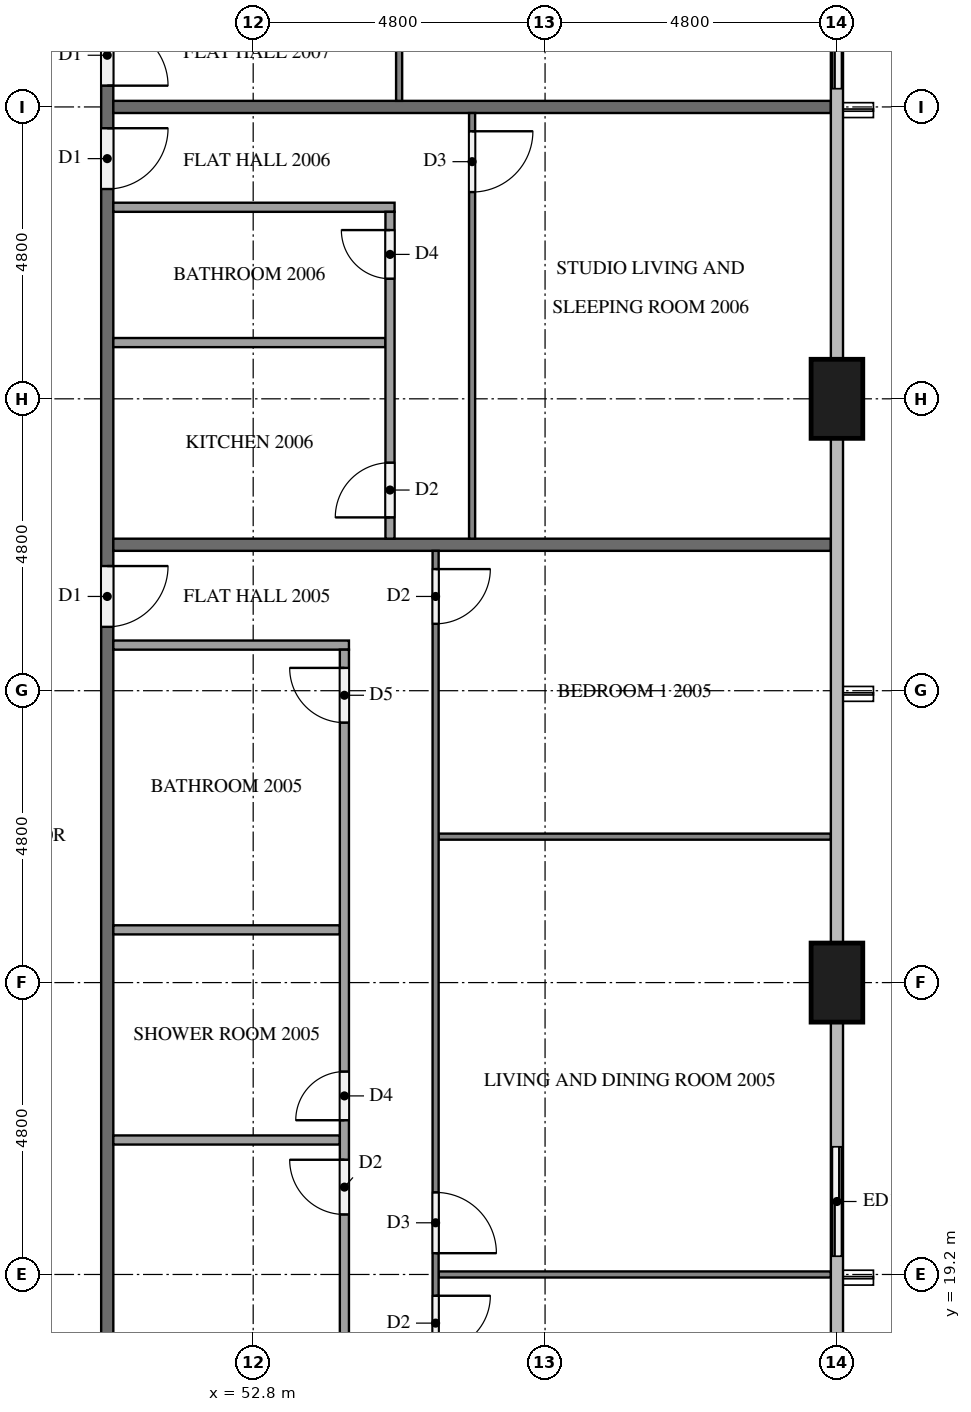
"""IFC4 building model, lengths in metres.
Left out: names, types, materials, properties, quantities, classifications, styles, units other than length and angle.
Written with IfcOpenShell. Run it as: python <this file> out.ifc"""

import sys

from ifc_helpers import new_model, si_unit, direction, frame, frame_2d, origin, origin_2d, place, context, subcontext, project, spatial, rectangle, extrude, element, fill, save


model = new_model("IFC4")
c1 = context("Model", 3, precision=1e-05, world=origin(), true_north=direction((0.0, 1.0)))
c2 = subcontext(c1, "Body", "Model", "MODEL_VIEW")
j1 = project(units=[si_unit("LENGTHUNIT", "METRE"), si_unit("PLANEANGLEUNIT", "RADIAN")], contexts=[c1])
p1 = place(None, origin())
s1 = spatial("IfcSite", under=j1, at=p1, CompositionType="ELEMENT")
p2 = place(p1, origin())
s2 = spatial("IfcBuilding", under=s1, at=p2, CompositionType="ELEMENT")
p3 = place(p2, frame((0.0, 0.0, 80.3)))
s3 = spatial("IfcBuildingStorey", under=s2, at=p3, CompositionType="ELEMENT", Elevation=80.3)
for number, where, z_axis, x_axis in (
    (1, (62.4, 24.0, 0.0), (0.0, 0.0, 1.0), (0.0, 1.0, 0.0)),
    (2, (62.4, 33.6, 0.0), (0.0, 0.0, 1.0), (0.0, 1.0, 0.0)),
):
    element("IfcColumn", number, at=place(p3, frame(where, z_axis=z_axis, x_axis=x_axis)), inside=s3, PredefinedType="COLUMN", context=c2, shape_type="SweptSolid", body=[
        extrude(rectangle(XDim=1.3, YDim=0.85, at=origin_2d()), origin(), (0.0, 0.0, 1.0), 3.1),
    ])
p4 = place(p3, frame((62.4, 19.2, 0.0), z_axis=(0.0, 0.0, 1.0), x_axis=(0.0, 1.0, 0.0)))
e3 = element("IfcWall", 3, at=p4, inside=s3, PredefinedType="SOLIDWALL", context=c2, shape_type="SweptSolid", body=[
    extrude(rectangle(XDim=2.4, YDim=0.15, at=frame_2d((1.2, 0.0))), origin(), (0.0, 0.0, 1.0), 3.1),
])
p5 = place(p4, frame((0.3, 0.0, 0.0)))
e4 = element("IfcOpeningElement", 4, at=p5, cuts=e3, PredefinedType="OPENING", context=c2, shape_type="SweptSolid", body=[
    extrude(rectangle(XDim=1.8, YDim=2.4, at=frame_2d((0.9, 1.2))), frame((0.0, 0.085, 0.0), z_axis=(0.0, -1.0, 0.0), x_axis=(1.0, 0.0, 0.0)), (0.0, 0.0, 1.0), 0.17),
])
p6 = place(p3, frame((62.4, 38.4, 0.0), z_axis=(0.0, 0.0, 1.0), x_axis=(0.0, 1.0, 0.0)))
e5 = element("IfcWall", 5, at=p6, inside=s3, PredefinedType="SOLIDWALL", context=c2, shape_type="SweptSolid", body=[
    extrude(rectangle(XDim=2.4, YDim=0.15, at=frame_2d((1.2, 0.0))), origin(), (0.0, 0.0, 1.0), 3.1),
])
p7 = place(p6, frame((0.3, 0.0, 0.0)))
e6 = element("IfcOpeningElement", 6, at=p7, cuts=e5, PredefinedType="OPENING", context=c2, shape_type="SweptSolid", body=[
    extrude(rectangle(XDim=1.8, YDim=2.4, at=frame_2d((0.9, 1.2))), frame((0.0, 0.085, 0.0), z_axis=(0.0, -1.0, 0.0), x_axis=(1.0, 0.0, 0.0)), (0.0, 0.0, 1.0), 0.17),
])
p8 = place(p3, frame((50.4, 40.7, 0.0), z_axis=(0.0, 0.0, 1.0), x_axis=(0.0, -1.0, 0.0)))
e7 = element("IfcWall", 7, at=p8, inside=s3, PredefinedType="PARTITIONING", context=c2, shape_type="SweptSolid", body=[
    extrude(rectangle(XDim=28.6, YDim=0.2, at=frame_2d((14.3, 0.0))), origin(), (0.0, 0.0, 1.0), 3.1),
])
p9 = place(p8, frame((26.65, 0.0, 0.0)))
e8 = element("IfcOpeningElement", 8, at=p9, cuts=e7, PredefinedType="OPENING", context=c2, shape_type="SweptSolid", body=[
    extrude(rectangle(XDim=1.0, YDim=2.1, at=frame_2d((0.5, 1.05))), frame((0.0, 0.11, 0.0), z_axis=(0.0, -1.0, 0.0), x_axis=(1.0, 0.0, 0.0)), (0.0, 0.0, 1.0), 0.22),
])
p10 = place(p8, frame((9.85, 0.0, 0.0)))
e9 = element("IfcOpeningElement", 9, at=p10, cuts=e7, PredefinedType="OPENING", context=c2, shape_type="SweptSolid", body=[
    extrude(rectangle(XDim=1.0, YDim=2.1, at=frame_2d((0.5, 1.05))), frame((0.0, 0.11, 0.0), z_axis=(0.0, -1.0, 0.0), x_axis=(1.0, 0.0, 0.0)), (0.0, 0.0, 1.0), 0.22),
])
p11 = place(p8, frame((2.65, 0.0, 0.0)))
e10 = element("IfcOpeningElement", 10, at=p11, cuts=e7, PredefinedType="OPENING", context=c2, shape_type="SweptSolid", body=[
    extrude(rectangle(XDim=1.0, YDim=2.1, at=frame_2d((0.5, 1.05))), frame((0.0, 0.11, 0.0), z_axis=(0.0, -1.0, 0.0), x_axis=(1.0, 0.0, 0.0)), (0.0, 0.0, 1.0), 0.22),
])
p12 = place(p8, frame((0.95, 0.0, 0.0)))
e11 = element("IfcOpeningElement", 11, at=p12, cuts=e7, PredefinedType="OPENING", context=c2, shape_type="SweptSolid", body=[
    extrude(rectangle(XDim=1.0, YDim=2.1, at=frame_2d((0.5, 1.05))), frame((0.0, 0.11, 0.0), z_axis=(0.0, -1.0, 0.0), x_axis=(1.0, 0.0, 0.0)), (0.0, 0.0, 1.0), 0.22),
])
for number, where, z_axis, x_axis in (
    (12, (50.5, 31.2, 0.0), (0.0, 0.0, 1.0), (1.0, 0.0, 0.0)),
    (13, (50.5, 38.4, 0.0), (0.0, 0.0, 1.0), (1.0, 0.0, 0.0)),
):
    element("IfcWall", number, at=place(p3, frame(where, z_axis=z_axis, x_axis=x_axis)), inside=s3, PredefinedType="PARTITIONING", context=c2, shape_type="SweptSolid", body=[
        extrude(rectangle(XDim=11.8, YDim=0.2, at=frame_2d((5.9, 0.0))), origin(), (0.0, 0.0, 1.0), 3.1),
    ])
for number, where, z_axis, x_axis in (
    (14, (55.85, 26.4, 0.0), (0.0, 0.0, 1.0), (1.0, 0.0, 0.0)),
    (15, (55.85, 19.2, 0.0), (0.0, 0.0, 1.0), (1.0, 0.0, 0.0)),
):
    element("IfcWall", number, at=place(p3, frame(where, z_axis=z_axis, x_axis=x_axis)), inside=s3, PredefinedType="PARTITIONING", context=c2, shape_type="SweptSolid", body=[
        extrude(rectangle(XDim=6.45, YDim=0.1, at=frame_2d((3.225, 0.0))), origin(), (0.0, 0.0, 1.0), 3.1),
    ])
p13 = place(p3, frame((55.8, 31.1, 0.0), z_axis=(0.0, 0.0, 1.0), x_axis=(0.0, -1.0, 0.0)))
e16 = element("IfcWall", 16, at=p13, inside=s3, PredefinedType="PARTITIONING", context=c2, shape_type="SweptSolid", body=[
    extrude(rectangle(XDim=16.6, YDim=0.1, at=frame_2d((8.3, 0.0))), origin(), (0.0, 0.0, 1.0), 3.1),
])
p14 = place(p13, frame((0.3, 0.0, 0.0)))
e17 = element("IfcOpeningElement", 17, at=p14, cuts=e16, PredefinedType="OPENING", context=c2, shape_type="SweptSolid", body=[
    extrude(rectangle(XDim=0.9, YDim=2.1, at=frame_2d((0.45, 1.05))), frame((0.0, 0.06, 0.0), z_axis=(0.0, -1.0, 0.0), x_axis=(1.0, 0.0, 0.0)), (0.0, 0.0, 1.0), 0.12),
])
p15 = place(p13, frame((10.55, 0.0, 0.0)))
e18 = element("IfcOpeningElement", 18, at=p15, cuts=e16, PredefinedType="OPENING", context=c2, shape_type="SweptSolid", body=[
    extrude(rectangle(XDim=1.0, YDim=2.1, at=frame_2d((0.5, 1.05))), frame((0.0, 0.06, 0.0), z_axis=(0.0, -1.0, 0.0), x_axis=(1.0, 0.0, 0.0)), (0.0, 0.0, 1.0), 0.12),
])
p16 = place(p13, frame((12.25, 0.0, 0.0)))
e19 = element("IfcOpeningElement", 19, at=p16, cuts=e16, PredefinedType="OPENING", context=c2, shape_type="SweptSolid", body=[
    extrude(rectangle(XDim=0.9, YDim=2.1, at=frame_2d((0.45, 1.05))), frame((0.0, 0.06, 0.0), z_axis=(0.0, -1.0, 0.0), x_axis=(1.0, 0.0, 0.0)), (0.0, 0.0, 1.0), 0.12),
])
for number, where, z_axis, x_axis in (
    (20, (50.5, 24.867, 0.0), (0.0, 0.0, 1.0), (1.0, 0.0, 0.0)),
    (21, (50.5, 21.412, 0.0), (0.0, 0.0, 1.0), (1.0, 0.0, 0.0)),
):
    element("IfcWall", number, at=place(p3, frame(where, z_axis=z_axis, x_axis=x_axis)), inside=s3, PredefinedType="PARTITIONING", context=c2, shape_type="SweptSolid", body=[
        extrude(rectangle(XDim=3.725, YDim=0.15, at=frame_2d((1.863, 0.0))), origin(), (0.0, 0.0, 1.0), 3.1),
    ])
p17 = place(p3, frame((50.5, 29.55, 0.0), z_axis=(0.0, 0.0, 1.0), x_axis=(1.0, 0.0, 0.0)))
e22 = element("IfcWall", 22, at=p17, inside=s3, PredefinedType="PARTITIONING", context=c2, shape_type="SweptSolid", body=[
    extrude(rectangle(XDim=3.875, YDim=0.15, at=frame_2d((1.938, 0.0))), origin(), (0.0, 0.0, 1.0), 3.1),
])
p18 = place(p3, frame((54.3, 14.5, 0.0), z_axis=(0.0, 0.0, 1.0), x_axis=(0.0, 1.0, 0.0)))
e23 = element("IfcWall", 23, at=p18, inside=s3, PredefinedType="PARTITIONING", context=c2, shape_type="SweptSolid", body=[
    extrude(rectangle(XDim=14.975, YDim=0.15, at=frame_2d((7.488, 0.0))), origin(), (0.0, 0.0, 1.0), 3.1),
])
p19 = place(p18, frame((13.775, 0.0, 0.0)))
e24 = element("IfcOpeningElement", 24, at=p19, cuts=e23, PredefinedType="OPENING", context=c2, shape_type="SweptSolid", body=[
    extrude(rectangle(XDim=0.9, YDim=2.1, at=frame_2d((0.45, 1.05))), frame((0.0, 0.085, 0.0), z_axis=(0.0, -1.0, 0.0), x_axis=(1.0, 0.0, 0.0)), (0.0, 0.0, 1.0), 0.17),
])
p20 = place(p18, frame((7.237, 0.0, 0.0)))
e25 = element("IfcOpeningElement", 25, at=p20, cuts=e23, PredefinedType="OPENING", context=c2, shape_type="SweptSolid", body=[
    extrude(rectangle(XDim=0.8, YDim=2.1, at=frame_2d((0.4, 1.05))), frame((0.0, 0.085, 0.0), z_axis=(0.0, -1.0, 0.0), x_axis=(1.0, 0.0, 0.0)), (0.0, 0.0, 1.0), 0.17),
])
p21 = place(p18, frame((5.687, 0.0, 0.0)))
e26 = element("IfcOpeningElement", 26, at=p21, cuts=e23, PredefinedType="OPENING", context=c2, shape_type="SweptSolid", body=[
    extrude(rectangle(XDim=0.9, YDim=2.1, at=frame_2d((0.45, 1.05))), frame((0.0, 0.085, 0.0), z_axis=(0.0, -1.0, 0.0), x_axis=(1.0, 0.0, 0.0)), (0.0, 0.0, 1.0), 0.17),
])
p22 = place(p3, frame((56.4, 38.3, 0.0), z_axis=(0.0, 0.0, 1.0), x_axis=(0.0, -1.0, 0.0)))
e27 = element("IfcWall", 27, at=p22, inside=s3, PredefinedType="PARTITIONING", context=c2, shape_type="SweptSolid", body=[
    extrude(rectangle(XDim=7.0, YDim=0.1, at=frame_2d((3.5, 0.0))), origin(), (0.0, 0.0, 1.0), 3.1),
])
p23 = place(p22, frame((0.3, 0.0, 0.0)))
e28 = element("IfcOpeningElement", 28, at=p23, cuts=e27, PredefinedType="OPENING", context=c2, shape_type="SweptSolid", body=[
    extrude(rectangle(XDim=1.0, YDim=2.1, at=frame_2d((0.5, 1.05))), frame((0.0, 0.06, 0.0), z_axis=(0.0, -1.0, 0.0), x_axis=(1.0, 0.0, 0.0)), (0.0, 0.0, 1.0), 0.12),
])
p24 = place(p3, frame((50.5, 34.525, 0.0), z_axis=(0.0, 0.0, 1.0), x_axis=(1.0, 0.0, 0.0)))
e29 = element("IfcWall", 29, at=p24, inside=s3, PredefinedType="PARTITIONING", context=c2, shape_type="SweptSolid", body=[
    extrude(rectangle(XDim=4.475, YDim=0.15, at=frame_2d((2.238, 0.0))), origin(), (0.0, 0.0, 1.0), 3.1),
])
p25 = place(p3, frame((50.5, 36.75, 0.0), z_axis=(0.0, 0.0, 1.0), x_axis=(1.0, 0.0, 0.0)))
e30 = element("IfcWall", 30, at=p25, inside=s3, PredefinedType="PARTITIONING", context=c2, shape_type="SweptSolid", body=[
    extrude(rectangle(XDim=4.625, YDim=0.15, at=frame_2d((2.312, 0.0))), origin(), (0.0, 0.0, 1.0), 3.1),
])
p26 = place(p3, frame((55.05, 31.3, 0.0), z_axis=(0.0, 0.0, 1.0), x_axis=(0.0, 1.0, 0.0)))
e31 = element("IfcWall", 31, at=p26, inside=s3, PredefinedType="PARTITIONING", context=c2, shape_type="SweptSolid", body=[
    extrude(rectangle(XDim=5.375, YDim=0.15, at=frame_2d((2.688, 0.0))), origin(), (0.0, 0.0, 1.0), 3.1),
])
p27 = place(p26, frame((4.275, 0.0, 0.0)))
e32 = element("IfcOpeningElement", 32, at=p27, cuts=e31, PredefinedType="OPENING", context=c2, shape_type="SweptSolid", body=[
    extrude(rectangle(XDim=0.8, YDim=2.1, at=frame_2d((0.4, 1.05))), frame((0.0, 0.085, 0.0), z_axis=(0.0, -1.0, 0.0), x_axis=(1.0, 0.0, 0.0)), (0.0, 0.0, 1.0), 0.17),
])
p28 = place(p26, frame((0.35, 0.0, 0.0)))
e33 = element("IfcOpeningElement", 33, at=p28, cuts=e31, PredefinedType="OPENING", context=c2, shape_type="SweptSolid", body=[
    extrude(rectangle(XDim=0.9, YDim=2.1, at=frame_2d((0.45, 1.05))), frame((0.0, 0.085, 0.0), z_axis=(0.0, -1.0, 0.0), x_axis=(1.0, 0.0, 0.0)), (0.0, 0.0, 1.0), 0.17),
])
p29 = place(p3, frame((55.2, 47.9, 0.0), z_axis=(0.0, 0.0, 1.0), x_axis=(0.0, -1.0, 0.0)))
e34 = element("IfcWall", 34, at=p29, inside=s3, PredefinedType="PARTITIONING", context=c2, shape_type="SweptSolid", body=[
    extrude(rectangle(XDim=9.4, YDim=0.1, at=frame_2d((4.7, 0.0))), origin(), (0.0, 0.0, 1.0), 3.1),
])
p30 = place(p29, frame((5.05, 0.0, 0.0)))
e35 = element("IfcOpeningElement", 35, at=p30, cuts=e34, PredefinedType="OPENING", context=c2, shape_type="SweptSolid", body=[
    extrude(rectangle(XDim=1.0, YDim=2.1, at=frame_2d((0.5, 1.05))), frame((0.0, 0.06, 0.0), z_axis=(0.0, -1.0, 0.0), x_axis=(1.0, 0.0, 0.0)), (0.0, 0.0, 1.0), 0.12),
])
p31 = place(p29, frame((3.45, 0.0, 0.0)))
e36 = element("IfcOpeningElement", 36, at=p31, cuts=e34, PredefinedType="OPENING", context=c2, shape_type="SweptSolid", body=[
    extrude(rectangle(XDim=0.9, YDim=2.1, at=frame_2d((0.45, 1.05))), frame((0.0, 0.06, 0.0), z_axis=(0.0, -1.0, 0.0), x_axis=(1.0, 0.0, 0.0)), (0.0, 0.0, 1.0), 0.12),
])
p32 = place(p5, origin())
e37 = element("IfcDoor", 37, at=p32, inside=s3, OperationType="SLIDING_TO_RIGHT", PredefinedType="DOOR", context=c2, shape_type="SweptSolid", body=[
    extrude(rectangle(XDim=1.8, YDim=2.4, at=frame_2d((0.9, 1.2))), frame((0.0, 0.025, 0.0), z_axis=(0.0, -1.0, 0.0), x_axis=(1.0, 0.0, 0.0)), (0.0, 0.0, 1.0), 0.05),
])
fill(e4, e37)
p33 = place(p7, origin())
e38 = element("IfcDoor", 38, at=p33, inside=s3, OperationType="SLIDING_TO_LEFT", PredefinedType="DOOR", context=c2, shape_type="SweptSolid", body=[
    extrude(rectangle(XDim=1.8, YDim=2.4, at=frame_2d((0.9, 1.2))), frame((0.0, 0.025, 0.0), z_axis=(0.0, -1.0, 0.0), x_axis=(1.0, 0.0, 0.0)), (0.0, 0.0, 1.0), 0.05),
])
fill(e6, e38)
p34 = place(p10, origin())
e39 = element("IfcDoor", 39, at=p34, inside=s3, OperationType="SINGLE_SWING_LEFT", PredefinedType="DOOR", context=c2, shape_type="SweptSolid", body=[
    extrude(rectangle(XDim=1.0, YDim=2.1, at=frame_2d((0.5, 1.05))), frame((0.0, 0.025, 0.0), z_axis=(0.0, -1.0, 0.0), x_axis=(1.0, 0.0, 0.0)), (0.0, 0.0, 1.0), 0.05),
])
fill(e9, e39)
p35 = place(p11, origin())
e40 = element("IfcDoor", 40, at=p35, inside=s3, OperationType="SINGLE_SWING_LEFT", PredefinedType="DOOR", context=c2, shape_type="SweptSolid", body=[
    extrude(rectangle(XDim=1.0, YDim=2.1, at=frame_2d((0.5, 1.05))), frame((0.0, 0.025, 0.0), z_axis=(0.0, -1.0, 0.0), x_axis=(1.0, 0.0, 0.0)), (0.0, 0.0, 1.0), 0.05),
])
fill(e10, e40)
p36 = place(p12, origin())
e41 = element("IfcDoor", 41, at=p36, inside=s3, OperationType="SINGLE_SWING_RIGHT", PredefinedType="DOOR", context=c2, shape_type="SweptSolid", body=[
    extrude(rectangle(XDim=1.0, YDim=2.1, at=frame_2d((0.5, 1.05))), frame((0.0, 0.025, 0.0), z_axis=(0.0, -1.0, 0.0), x_axis=(1.0, 0.0, 0.0)), (0.0, 0.0, 1.0), 0.05),
])
fill(e11, e41)
p37 = place(p14, origin())
e42 = element("IfcDoor", 42, at=p37, inside=s3, OperationType="SINGLE_SWING_LEFT", PredefinedType="DOOR", context=c2, shape_type="SweptSolid", body=[
    extrude(rectangle(XDim=0.9, YDim=2.1, at=frame_2d((0.45, 1.05))), frame((0.0, 0.025, 0.0), z_axis=(0.0, -1.0, 0.0), x_axis=(1.0, 0.0, 0.0)), (0.0, 0.0, 1.0), 0.05),
])
fill(e17, e42)
p38 = place(p15, origin())
e43 = element("IfcDoor", 43, at=p38, inside=s3, OperationType="SINGLE_SWING_RIGHT", PredefinedType="DOOR", context=c2, shape_type="SweptSolid", body=[
    extrude(rectangle(XDim=1.0, YDim=2.1, at=frame_2d((0.5, 1.05))), frame((0.0, 0.025, 0.0), z_axis=(0.0, -1.0, 0.0), x_axis=(1.0, 0.0, 0.0)), (0.0, 0.0, 1.0), 0.05),
])
fill(e18, e43)
p39 = place(p16, origin())
e44 = element("IfcDoor", 44, at=p39, inside=s3, OperationType="SINGLE_SWING_LEFT", PredefinedType="DOOR", context=c2, shape_type="SweptSolid", body=[
    extrude(rectangle(XDim=0.9, YDim=2.1, at=frame_2d((0.45, 1.05))), frame((0.0, 0.025, 0.0), z_axis=(0.0, -1.0, 0.0), x_axis=(1.0, 0.0, 0.0)), (0.0, 0.0, 1.0), 0.05),
])
fill(e19, e44)
p40 = place(p19, origin())
e45 = element("IfcDoor", 45, at=p40, inside=s3, OperationType="SINGLE_SWING_RIGHT", PredefinedType="DOOR", context=c2, shape_type="SweptSolid", body=[
    extrude(rectangle(XDim=0.9, YDim=2.1, at=frame_2d((0.45, 1.05))), frame((0.0, 0.025, 0.0), z_axis=(0.0, -1.0, 0.0), x_axis=(1.0, 0.0, 0.0)), (0.0, 0.0, 1.0), 0.05),
])
fill(e24, e45)
p41 = place(p20, origin())
e46 = element("IfcDoor", 46, at=p41, inside=s3, OperationType="SINGLE_SWING_LEFT", PredefinedType="DOOR", context=c2, shape_type="SweptSolid", body=[
    extrude(rectangle(XDim=0.8, YDim=2.1, at=frame_2d((0.4, 1.05))), frame((0.0, 0.025, 0.0), z_axis=(0.0, -1.0, 0.0), x_axis=(1.0, 0.0, 0.0)), (0.0, 0.0, 1.0), 0.05),
])
fill(e25, e46)
p42 = place(p21, origin())
e47 = element("IfcDoor", 47, at=p42, inside=s3, OperationType="SINGLE_SWING_RIGHT", PredefinedType="DOOR", context=c2, shape_type="SweptSolid", body=[
    extrude(rectangle(XDim=0.9, YDim=2.1, at=frame_2d((0.45, 1.05))), frame((0.0, 0.025, 0.0), z_axis=(0.0, -1.0, 0.0), x_axis=(1.0, 0.0, 0.0)), (0.0, 0.0, 1.0), 0.05),
])
fill(e26, e47)
p43 = place(p23, origin())
e48 = element("IfcDoor", 48, at=p43, inside=s3, OperationType="SINGLE_SWING_LEFT", PredefinedType="DOOR", context=c2, shape_type="SweptSolid", body=[
    extrude(rectangle(XDim=1.0, YDim=2.1, at=frame_2d((0.5, 1.05))), frame((0.0, 0.025, 0.0), z_axis=(0.0, -1.0, 0.0), x_axis=(1.0, 0.0, 0.0)), (0.0, 0.0, 1.0), 0.05),
])
fill(e28, e48)
p44 = place(p27, origin())
e49 = element("IfcDoor", 49, at=p44, inside=s3, OperationType="SINGLE_SWING_RIGHT", PredefinedType="DOOR", context=c2, shape_type="SweptSolid", body=[
    extrude(rectangle(XDim=0.8, YDim=2.1, at=frame_2d((0.4, 1.05))), frame((0.0, 0.025, 0.0), z_axis=(0.0, -1.0, 0.0), x_axis=(1.0, 0.0, 0.0)), (0.0, 0.0, 1.0), 0.05),
])
fill(e32, e49)
p45 = place(p28, origin())
e50 = element("IfcDoor", 50, at=p45, inside=s3, OperationType="SINGLE_SWING_LEFT", PredefinedType="DOOR", context=c2, shape_type="SweptSolid", body=[
    extrude(rectangle(XDim=0.9, YDim=2.1, at=frame_2d((0.45, 1.05))), frame((0.0, 0.025, 0.0), z_axis=(0.0, -1.0, 0.0), x_axis=(1.0, 0.0, 0.0)), (0.0, 0.0, 1.0), 0.05),
])
fill(e33, e50)
save(model, sys.argv[1])
